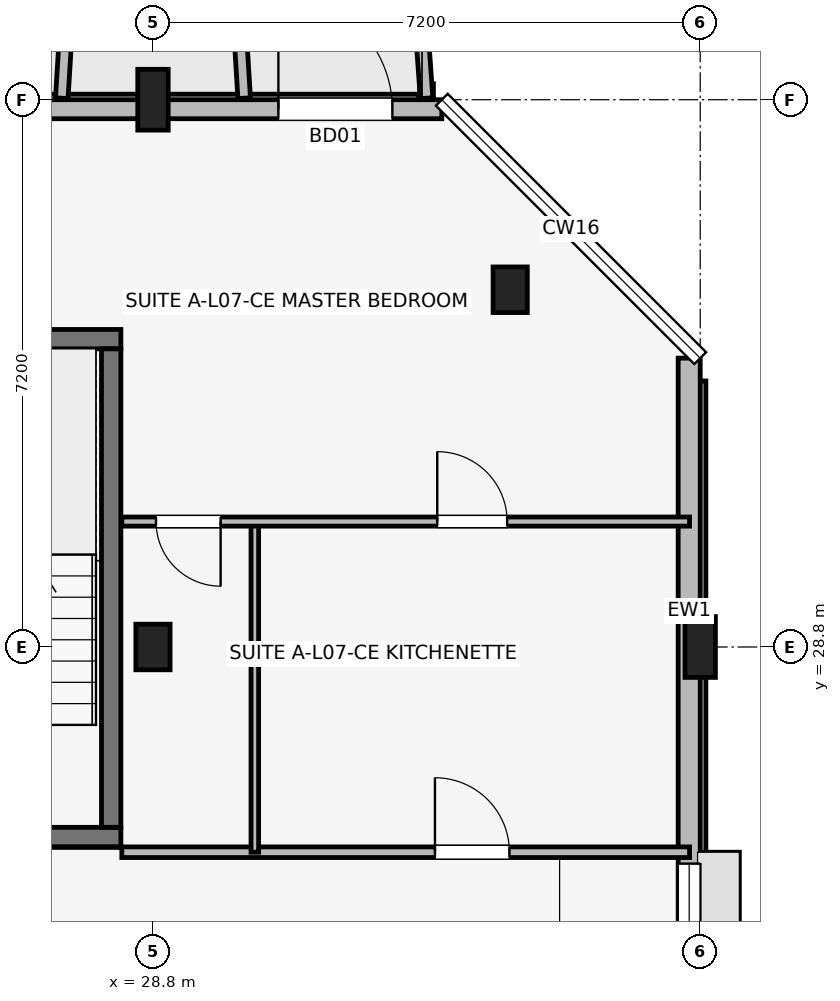
"""IFC4 building model, lengths in metres.
Left out: names, types, materials, properties, quantities, classifications, styles, units other than length and angle.
Written with IfcOpenShell. Run it as: python <this file> out.ifc"""

import sys

from ifc_helpers import new_model, si_unit, direction, frame, frame_2d, origin, origin_2d, place, context, subcontext, project, spatial, rectangle, extrude, element, fill, save


model = new_model("IFC4")
c1 = context("Model", 3, precision=1e-05, world=origin(), true_north=direction((0.0, 1.0)))
c2 = subcontext(c1, "Body", "Model", "MODEL_VIEW")
j1 = project(units=[si_unit("LENGTHUNIT", "METRE"), si_unit("PLANEANGLEUNIT", "RADIAN")], contexts=[c1])
p1 = place(None, origin())
s1 = spatial("IfcSite", under=j1, at=p1, CompositionType="ELEMENT")
p2 = place(p1, origin())
s2 = spatial("IfcBuilding", under=s1, at=p2, CompositionType="ELEMENT")
p3 = place(p2, frame((0.0, 0.0, 24.45)))
s3 = spatial("IfcBuildingStorey", under=s2, at=p3, CompositionType="ELEMENT", Elevation=24.45)
p4 = place(p3, frame((28.8, 28.8, 0.0), z_axis=(0.0, 0.0, 1.0), x_axis=(1.0, 0.0, 0.0)))
e1 = element("IfcColumn", 1, at=p4, inside=s3, PredefinedType="COLUMN", context=c2, shape_type="SweptSolid", body=[
    extrude(rectangle(XDim=0.45, YDim=0.6, at=origin_2d()), origin(), (0.0, 0.0, 1.0), 3.15),
])
for number, where, z_axis, x_axis in (
    (2, (28.8, 36.0, 0.0), (0.0, 0.0, 1.0), (1.0, 0.0, 0.0)),
    (3, (36.0, 28.8, 0.0), (0.0, 0.0, 1.0), (1.0, 0.0, 0.0)),
):
    element("IfcColumn", number, at=place(p3, frame(where, z_axis=z_axis, x_axis=x_axis)), inside=s3, PredefinedType="COLUMN", context=c2, shape_type="SweptSolid", body=[
        extrude(rectangle(XDim=0.4, YDim=0.8, at=origin_2d()), origin(), (0.0, 0.0, 1.0), 3.15),
    ])
p5 = place(p3, frame((33.5, 33.5, 0.0), z_axis=(0.0, 0.0, 1.0), x_axis=(1.0, 0.0, 0.0)))
e4 = element("IfcColumn", 4, at=p5, inside=s3, PredefinedType="COLUMN", context=c2, shape_type="SweptSolid", body=[
    extrude(rectangle(XDim=0.45, YDim=0.6, at=origin_2d()), origin(), (0.0, 0.0, 1.0), 3.15),
])
p6 = place(p3, frame((25.073, 26.3, 0.0), z_axis=(0.0, 0.0, 1.0), x_axis=(1.0, 0.0, 0.0)))
e5 = element("IfcWall", 5, at=p6, inside=s3, PredefinedType="SHEAR", context=c2, shape_type="SweptSolid", body=[
    extrude(rectangle(XDim=3.305, YDim=0.255, at=frame_2d((1.652, 0.0))), origin(), (0.0, 0.0, 1.0), 3.15),
])
p7 = place(p6, frame((1.127, 0.0, 0.0)))
e6 = element("IfcOpeningElement", 6, at=p7, cuts=e5, PredefinedType="OPENING", context=c2, shape_type="SweptSolid", body=[
    extrude(rectangle(XDim=1.05, YDim=2.12, at=frame_2d((0.525, 1.06))), frame((0.0, 0.137, 0.0), z_axis=(0.0, -1.0, 0.0), x_axis=(1.0, 0.0, 0.0)), (0.0, 0.0, 1.0), 0.275),
])
p8 = place(p3, frame((25.073, 32.85, 0.0), z_axis=(0.0, 0.0, 1.0), x_axis=(1.0, 0.0, 0.0)))
e7 = element("IfcWall", 7, at=p8, inside=s3, PredefinedType="SHEAR", context=c2, shape_type="SweptSolid", body=[
    extrude(rectangle(XDim=3.305, YDim=0.255, at=frame_2d((1.652, 0.0))), origin(), (0.0, 0.0, 1.0), 3.15),
])
p9 = place(p3, frame((28.25, 26.427, 0.0), z_axis=(0.0, 0.0, 1.0), x_axis=(0.0, 1.0, 0.0)))
e8 = element("IfcWall", 8, at=p9, inside=s3, PredefinedType="SHEAR", context=c2, shape_type="SweptSolid", body=[
    extrude(rectangle(XDim=6.295, YDim=0.255, at=frame_2d((3.147, 0.0))), origin(), (0.0, 0.0, 1.0), 3.15),
])
p10 = place(p3, frame((35.855, 17.8, 0.0), z_axis=(0.0, 0.0, 1.0), x_axis=(0.0, 1.0, 0.0)))
e9 = element("IfcWall", 9, at=p10, inside=s3, PredefinedType="SOLIDWALL", context=c2, shape_type="SweptSolid", body=[
    extrude(rectangle(XDim=14.8, YDim=0.29, at=frame_2d((7.4, 0.0))), origin(), (0.0, 0.0, 1.0), 2.43),
])
p11 = place(p10, frame((6.65, 0.0, 1.05)))
e10 = element("IfcOpeningElement", 10, at=p11, cuts=e9, PredefinedType="OPENING", context=c2, shape_type="SweptSolid", body=[
    extrude(rectangle(XDim=1.5, YDim=1.15, at=frame_2d((0.75, 0.575))), frame((0.0, 0.155, 0.0), z_axis=(0.0, -1.0, 0.0), x_axis=(1.0, 0.0, 0.0)), (0.0, 0.0, 1.0), 0.31),
])
p12 = place(p10, frame((0.84, 0.0, 0.75)))
e11 = element("IfcOpeningElement", 11, at=p12, cuts=e9, PredefinedType="OPENING", context=c2, shape_type="SweptSolid", body=[
    extrude(rectangle(XDim=1.3, YDim=1.55, at=frame_2d((0.65, 0.775))), frame((0.0, 0.155, 0.0), z_axis=(0.0, -1.0, 0.0), x_axis=(1.0, 0.0, 0.0)), (0.0, 0.0, 1.0), 0.31),
])
p13 = place(p3, frame((32.6, 35.875, 0.0), z_axis=(0.0, 0.0, 1.0), x_axis=(-1.0, 0.0, 0.0)))
e12 = element("IfcWall", 12, at=p13, inside=s3, PredefinedType="SOLIDWALL", context=c2, shape_type="SweptSolid", body=[
    extrude(rectangle(XDim=29.2, YDim=0.25, at=frame_2d((14.6, 0.0))), origin(), (0.0, 0.0, 1.0), 2.43),
])
p14 = place(p13, frame((28.7, 0.0, 0.0), z_axis=(0.0, 0.0, 1.0), x_axis=(-1.0, 0.0, 0.0)))
e13 = element("IfcOpeningElement", 13, at=p14, cuts=e12, PredefinedType="OPENING", context=c2, shape_type="SweptSolid", body=[
    extrude(rectangle(XDim=1.8, YDim=2.15, at=frame_2d((0.9, 1.075))), frame((0.0, 0.135, 0.0), z_axis=(0.0, -1.0, 0.0), x_axis=(1.0, 0.0, 0.0)), (0.0, 0.0, 1.0), 0.27),
])
p15 = place(p13, frame((2.15, 0.0, 0.0), z_axis=(0.0, 0.0, 1.0), x_axis=(-1.0, 0.0, 0.0)))
e14 = element("IfcOpeningElement", 14, at=p15, cuts=e12, PredefinedType="OPENING", context=c2, shape_type="SweptSolid", body=[
    extrude(rectangle(XDim=1.5, YDim=2.15, at=frame_2d((0.75, 1.075))), frame((0.0, 0.135, 0.0), z_axis=(0.0, -1.0, 0.0), x_axis=(1.0, 0.0, 0.0)), (0.0, 0.0, 1.0), 0.27),
])
p16 = place(p13, frame((14.955, 0.0, 0.5)))
e15 = element("IfcOpeningElement", 15, at=p16, cuts=e12, PredefinedType="OPENING", context=c2, shape_type="SweptSolid", body=[
    extrude(rectangle(XDim=0.9, YDim=1.8, at=frame_2d((0.45, 0.9))), frame((0.0, 0.135, 0.0), z_axis=(0.0, -1.0, 0.0), x_axis=(1.0, 0.0, 0.0)), (0.0, 0.0, 1.0), 0.27),
])
p17 = place(p13, frame((7.745, 0.0, 0.7)))
e16 = element("IfcOpeningElement", 16, at=p17, cuts=e12, PredefinedType="OPENING", context=c2, shape_type="SweptSolid", body=[
    extrude(rectangle(XDim=1.86, YDim=1.6, at=frame_2d((0.93, 0.8))), frame((0.0, 0.135, 0.0), z_axis=(0.0, -1.0, 0.0), x_axis=(1.0, 0.0, 0.0)), (0.0, 0.0, 1.0), 0.27),
])
p18 = place(p13, frame((19.57, 0.0, 0.7)))
e17 = element("IfcOpeningElement", 17, at=p18, cuts=e12, PredefinedType="OPENING", context=c2, shape_type="SweptSolid", body=[
    extrude(rectangle(XDim=1.86, YDim=1.6, at=frame_2d((0.93, 0.8))), frame((0.0, 0.135, 0.0), z_axis=(0.0, -1.0, 0.0), x_axis=(1.0, 0.0, 0.0)), (0.0, 0.0, 1.0), 0.27),
])
p19 = place(p3, frame((27.6, 36.02, 0.0), z_axis=(0.0, 0.0, 1.0), x_axis=(0.061046865508, 0.998134900808, 0.0)))
e18 = element("IfcWall", 18, at=p19, inside=s3, PredefinedType="ELEMENTEDWALL", context=c2, shape_type="SweptSolid", body=[
    extrude(rectangle(XDim=1.964, YDim=0.165, at=frame_2d((0.982, 0.0))), origin(), (0.0, 0.0, 1.0), 2.58),
])
p20 = place(p3, frame((30.0, 36.02, 0.0), z_axis=(0.0, 0.0, 1.0), x_axis=(-0.061170732449, 0.998127317276, 0.0)))
e19 = element("IfcWall", 19, at=p20, inside=s3, PredefinedType="ELEMENTEDWALL", context=c2, shape_type="SweptSolid", body=[
    extrude(rectangle(XDim=1.964, YDim=0.165, at=frame_2d((0.982, 0.0))), origin(), (0.0, 0.0, 1.0), 2.8),
])
p21 = place(p3, frame((32.4, 36.02, 0.0), z_axis=(0.0, 0.0, 1.0), x_axis=(-0.071194071069, 0.997462482625, 0.0)))
e20 = element("IfcWall", 20, at=p21, inside=s3, PredefinedType="ELEMENTEDWALL", context=c2, shape_type="SweptSolid", body=[
    extrude(rectangle(XDim=1.965, YDim=0.165, at=frame_2d((0.982, 0.0))), origin(), (0.0, 0.0, 1.0), 2.8),
])
p22 = place(p3, frame((28.39, 26.1, 0.0), z_axis=(0.0, 0.0, 1.0), x_axis=(1.0, 0.0, 0.0)))
e21 = element("IfcWall", 21, at=p22, inside=s3, PredefinedType="PARTITIONING", context=c2, shape_type="SweptSolid", body=[
    extrude(rectangle(XDim=7.47, YDim=0.14, at=frame_2d((3.735, 0.0))), origin(), (0.0, 0.0, 1.0), 2.38),
])
p23 = place(p22, frame((4.12, 0.0, 0.0)))
e22 = element("IfcOpeningElement", 22, at=p23, cuts=e21, PredefinedType="OPENING", context=c2, shape_type="SweptSolid", body=[
    extrude(rectangle(XDim=0.98, YDim=2.1, at=frame_2d((0.49, 1.05))), frame((0.0, 0.08, 0.0), z_axis=(0.0, -1.0, 0.0), x_axis=(1.0, 0.0, 0.0)), (0.0, 0.0, 1.0), 0.16),
])
p24 = place(p3, frame((30.14, 26.1, 0.0), z_axis=(0.0, 0.0, 1.0), x_axis=(0.0, 1.0, 0.0)))
e23 = element("IfcWall", 23, at=p24, inside=s3, PredefinedType="PARTITIONING", context=c2, shape_type="SweptSolid", body=[
    extrude(rectangle(XDim=4.35, YDim=0.1, at=frame_2d((2.175, 0.0))), origin(), (0.0, 0.0, 1.0), 2.38),
])
p25 = place(p3, frame((28.39, 30.45, 0.0), z_axis=(0.0, 0.0, 1.0), x_axis=(1.0, 0.0, 0.0)))
e24 = element("IfcWall", 24, at=p25, inside=s3, PredefinedType="PARTITIONING", context=c2, shape_type="SweptSolid", body=[
    extrude(rectangle(XDim=7.47, YDim=0.12, at=frame_2d((3.735, 0.0))), origin(), (0.0, 0.0, 1.0), 2.38),
])
p26 = place(p25, frame((1.3, 0.0, 0.0), z_axis=(0.0, 0.0, 1.0), x_axis=(-1.0, 0.0, 0.0)))
e25 = element("IfcOpeningElement", 25, at=p26, cuts=e24, PredefinedType="OPENING", context=c2, shape_type="SweptSolid", body=[
    extrude(rectangle(XDim=0.85, YDim=2.08, at=frame_2d((0.425, 1.04))), frame((0.0, 0.07, 0.0), z_axis=(0.0, -1.0, 0.0), x_axis=(1.0, 0.0, 0.0)), (0.0, 0.0, 1.0), 0.14),
])
p27 = place(p25, frame((4.15, 0.0, 0.0)))
e26 = element("IfcOpeningElement", 26, at=p27, cuts=e24, PredefinedType="OPENING", context=c2, shape_type="SweptSolid", body=[
    extrude(rectangle(XDim=0.92, YDim=2.08, at=frame_2d((0.46, 1.04))), frame((0.0, 0.07, 0.0), z_axis=(0.0, -1.0, 0.0), x_axis=(1.0, 0.0, 0.0)), (0.0, 0.0, 1.0), 0.14),
])
p28 = place(p15, origin())
e27 = element("IfcDoor", 27, at=p28, inside=s3, OperationType="SINGLE_SWING_RIGHT", PredefinedType="DOOR", context=c2, shape_type="SweptSolid", body=[
    extrude(rectangle(XDim=1.5, YDim=2.15, at=frame_2d((0.75, 1.075))), frame((0.0, 0.025, 0.0), z_axis=(0.0, -1.0, 0.0), x_axis=(1.0, 0.0, 0.0)), (0.0, 0.0, 1.0), 0.05),
])
fill(e14, e27)
p29 = place(p11, origin())
e28 = element("IfcWindow", 28, at=p29, inside=s3, PartitioningType="SINGLE_PANEL", PredefinedType="WINDOW", context=c2, shape_type="SweptSolid", body=[
    extrude(rectangle(XDim=1.5, YDim=1.15, at=frame_2d((0.75, 0.575))), frame((0.0, 0.03, 0.0), z_axis=(0.0, -1.0, 0.0), x_axis=(1.0, 0.0, 0.0)), (0.0, 0.0, 1.0), 0.06),
])
fill(e10, e28)
p30 = place(p23, origin())
e29 = element("IfcDoor", 29, at=p30, inside=s3, OperationType="SINGLE_SWING_LEFT", PredefinedType="DOOR", context=c2, shape_type="SweptSolid", body=[
    extrude(rectangle(XDim=0.98, YDim=2.1, at=frame_2d((0.49, 1.05))), frame((0.0, 0.025, 0.0), z_axis=(0.0, -1.0, 0.0), x_axis=(1.0, 0.0, 0.0)), (0.0, 0.0, 1.0), 0.05),
])
fill(e22, e29)
p31 = place(p26, origin())
e30 = element("IfcDoor", 30, at=p31, inside=s3, OperationType="SINGLE_SWING_RIGHT", PredefinedType="DOOR", context=c2, shape_type="SweptSolid", body=[
    extrude(rectangle(XDim=0.85, YDim=2.08, at=frame_2d((0.425, 1.04))), frame((0.0, 0.025, 0.0), z_axis=(0.0, -1.0, 0.0), x_axis=(1.0, 0.0, 0.0)), (0.0, 0.0, 1.0), 0.05),
])
fill(e25, e30)
p32 = place(p27, origin())
e31 = element("IfcDoor", 31, at=p32, inside=s3, OperationType="SINGLE_SWING_LEFT", PredefinedType="DOOR", context=c2, shape_type="SweptSolid", body=[
    extrude(rectangle(XDim=0.92, YDim=2.08, at=frame_2d((0.46, 1.04))), frame((0.0, 0.025, 0.0), z_axis=(0.0, -1.0, 0.0), x_axis=(1.0, 0.0, 0.0)), (0.0, 0.0, 1.0), 0.05),
])
fill(e26, e31)
save(model, sys.argv[1])
